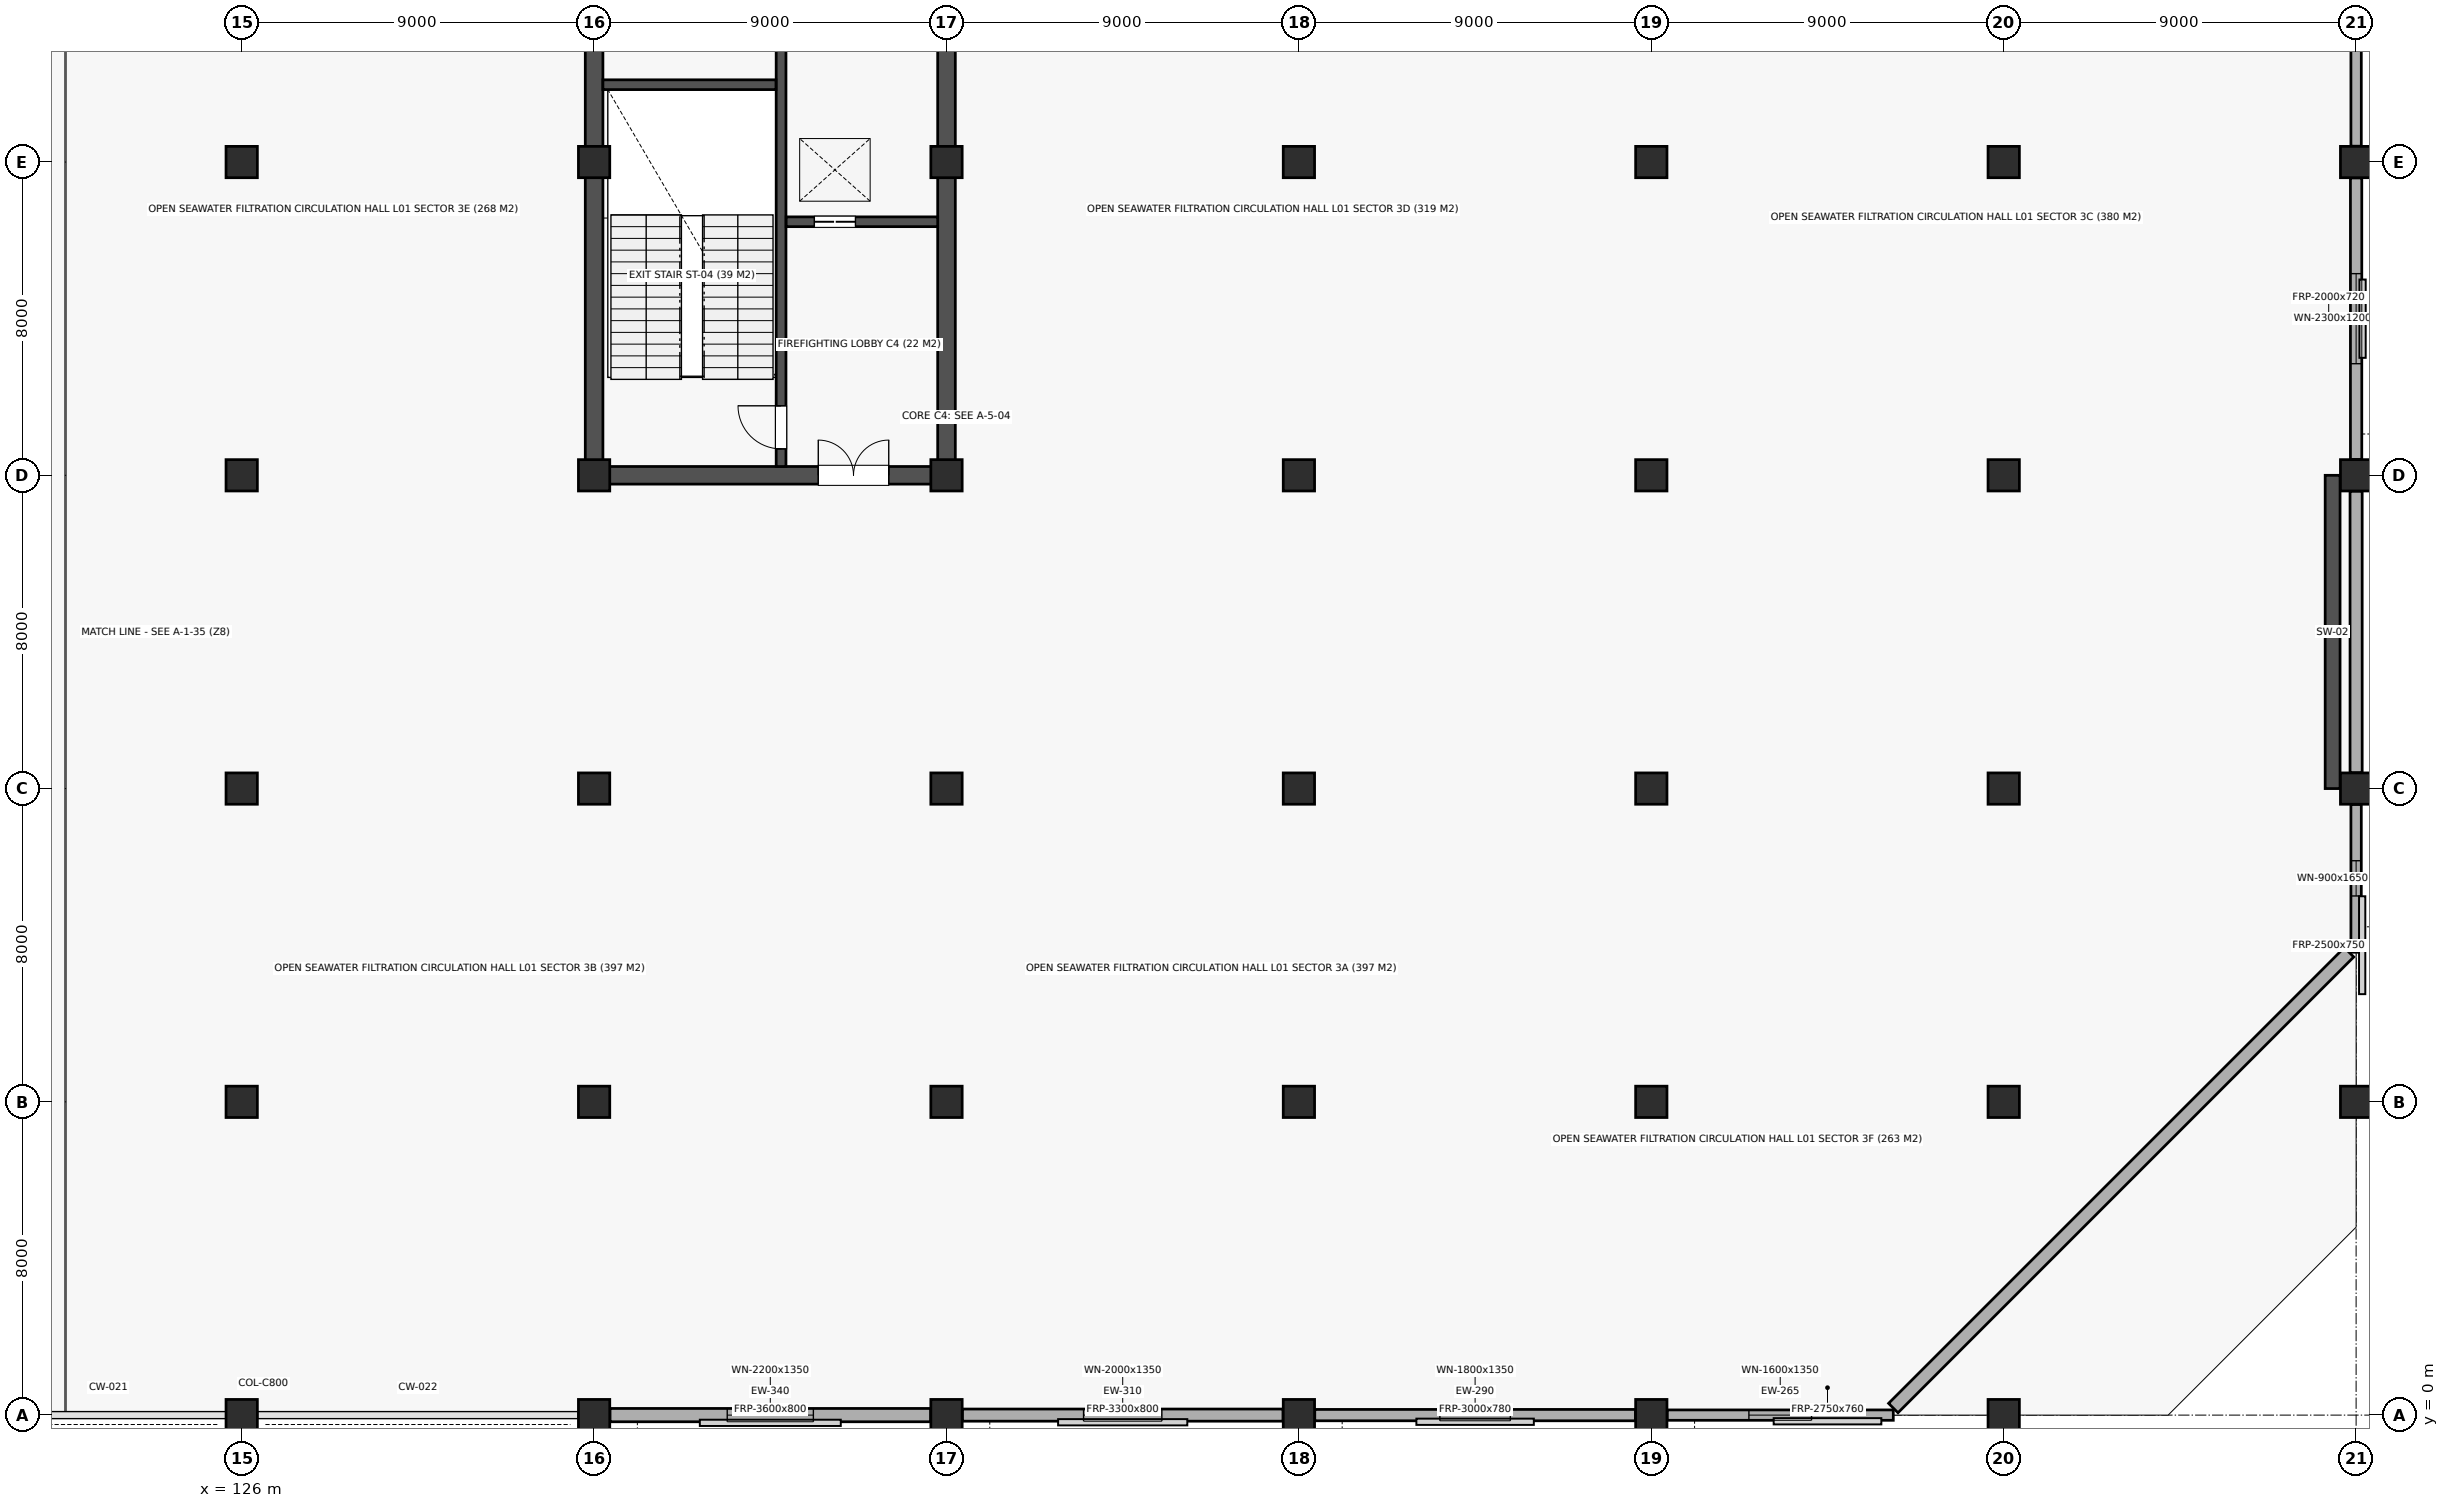
"""IFC4 building model, lengths in metres.
Left out: names, types, materials, properties, quantities, classifications, styles, units other than length and angle.
Written with IfcOpenShell. Run it as: python <this file> out.ifc"""

import sys

from ifc_helpers import new_model, si_unit, direction, frame, frame_2d, origin, origin_2d, place, context, subcontext, project, spatial, rectangle, extrude, element, fill, save


model = new_model("IFC4")
c1 = context("Model", 3, precision=1e-05, world=origin(), true_north=direction((0.0, 1.0)))
c2 = subcontext(c1, "Body", "Model", "MODEL_VIEW")
j1 = project(units=[si_unit("LENGTHUNIT", "METRE"), si_unit("PLANEANGLEUNIT", "RADIAN")], contexts=[c1])
p1 = place(None, origin())
s1 = spatial("IfcSite", under=j1, at=p1, CompositionType="ELEMENT")
p2 = place(p1, origin())
s2 = spatial("IfcBuilding", under=s1, at=p2, CompositionType="ELEMENT")
p3 = place(p2, frame((0.0, 0.0, 4.5)))
s3 = spatial("IfcBuildingStorey", under=s2, at=p3, CompositionType="ELEMENT", Elevation=4.5)
for number, where, z_axis, x_axis in (
    (1, (126.0, 0.0, 0.0), (0.0, 0.0, 1.0), (1.0, 0.0, 0.0)),
    (2, (126.0, 8.0, 0.0), (0.0, 0.0, 1.0), (1.0, 0.0, 0.0)),
    (3, (126.0, 16.0, 0.0), (0.0, 0.0, 1.0), (1.0, 0.0, 0.0)),
    (4, (126.0, 24.0, 0.0), (0.0, 0.0, 1.0), (1.0, 0.0, 0.0)),
    (5, (126.0, 32.0, 0.0), (0.0, 0.0, 1.0), (1.0, 0.0, 0.0)),
    (6, (135.0, 0.0, 0.0), (0.0, 0.0, 1.0), (1.0, 0.0, 0.0)),
    (7, (135.0, 8.0, 0.0), (0.0, 0.0, 1.0), (1.0, 0.0, 0.0)),
    (8, (135.0, 16.0, 0.0), (0.0, 0.0, 1.0), (1.0, 0.0, 0.0)),
    (9, (135.0, 24.0, 0.0), (0.0, 0.0, 1.0), (1.0, 0.0, 0.0)),
    (10, (135.0, 32.0, 0.0), (0.0, 0.0, 1.0), (1.0, 0.0, 0.0)),
    (11, (144.0, 0.0, 0.0), (0.0, 0.0, 1.0), (1.0, 0.0, 0.0)),
    (12, (144.0, 8.0, 0.0), (0.0, 0.0, 1.0), (1.0, 0.0, 0.0)),
    (13, (144.0, 16.0, 0.0), (0.0, 0.0, 1.0), (1.0, 0.0, 0.0)),
    (14, (144.0, 24.0, 0.0), (0.0, 0.0, 1.0), (1.0, 0.0, 0.0)),
    (15, (144.0, 32.0, 0.0), (0.0, 0.0, 1.0), (1.0, 0.0, 0.0)),
    (16, (153.0, 0.0, 0.0), (0.0, 0.0, 1.0), (1.0, 0.0, 0.0)),
    (17, (153.0, 8.0, 0.0), (0.0, 0.0, 1.0), (1.0, 0.0, 0.0)),
    (18, (153.0, 16.0, 0.0), (0.0, 0.0, 1.0), (1.0, 0.0, 0.0)),
    (19, (153.0, 24.0, 0.0), (0.0, 0.0, 1.0), (1.0, 0.0, 0.0)),
    (20, (153.0, 32.0, 0.0), (0.0, 0.0, 1.0), (1.0, 0.0, 0.0)),
    (21, (162.0, 0.0, 0.0), (0.0, 0.0, 1.0), (1.0, 0.0, 0.0)),
    (22, (162.0, 8.0, 0.0), (0.0, 0.0, 1.0), (1.0, 0.0, 0.0)),
    (23, (162.0, 16.0, 0.0), (0.0, 0.0, 1.0), (1.0, 0.0, 0.0)),
    (24, (162.0, 24.0, 0.0), (0.0, 0.0, 1.0), (1.0, 0.0, 0.0)),
    (25, (162.0, 32.0, 0.0), (0.0, 0.0, 1.0), (1.0, 0.0, 0.0)),
    (26, (171.0, 0.0, 0.0), (0.0, 0.0, 1.0), (1.0, 0.0, 0.0)),
    (27, (171.0, 8.0, 0.0), (0.0, 0.0, 1.0), (1.0, 0.0, 0.0)),
    (28, (171.0, 16.0, 0.0), (0.0, 0.0, 1.0), (1.0, 0.0, 0.0)),
    (29, (171.0, 24.0, 0.0), (0.0, 0.0, 1.0), (1.0, 0.0, 0.0)),
    (30, (171.0, 32.0, 0.0), (0.0, 0.0, 1.0), (1.0, 0.0, 0.0)),
    (31, (180.0, 8.0, 0.0), (0.0, 0.0, 1.0), (1.0, 0.0, 0.0)),
    (32, (180.0, 16.0, 0.0), (0.0, 0.0, 1.0), (1.0, 0.0, 0.0)),
    (33, (180.0, 24.0, 0.0), (0.0, 0.0, 1.0), (1.0, 0.0, 0.0)),
    (34, (180.0, 32.0, 0.0), (0.0, 0.0, 1.0), (1.0, 0.0, 0.0)),
):
    element("IfcColumn", number, at=place(p3, frame(where, z_axis=z_axis, x_axis=x_axis)), inside=s3, PredefinedType="COLUMN", context=c2, shape_type="SweptSolid", body=[
        extrude(rectangle(XDim=0.8, YDim=0.8, at=origin_2d()), origin(), (0.0, 0.0, 1.0), 4.5),
    ])
p4 = place(p3, frame((179.4, 16.0, 0.0), z_axis=(0.0, 0.0, 1.0), x_axis=(0.0, 1.0, 0.0)))
e35 = element("IfcWall", 35, at=p4, inside=s3, PredefinedType="SHEAR", context=c2, shape_type="SweptSolid", body=[
    extrude(rectangle(XDim=8.0, YDim=0.38, at=frame_2d((4.0, 0.0))), origin(), (0.0, 0.0, 1.0), 4.18),
])
p5 = place(p3, frame((135.225, 24.0, 0.0), z_axis=(0.0, 0.0, 1.0), x_axis=(1.0, 0.0, 0.0)))
e36 = element("IfcWall", 36, at=p5, inside=s3, PredefinedType="SHEAR", context=c2, shape_type="SweptSolid", body=[
    extrude(rectangle(XDim=8.55, YDim=0.45, at=frame_2d((4.275, 0.0))), origin(), (0.0, 0.0, 1.0), 4.18),
])
p6 = place(p5, frame((5.5, 0.0, 0.0)))
e37 = element("IfcOpeningElement", 37, at=p6, cuts=e36, PredefinedType="OPENING", context=c2, shape_type="SweptSolid", body=[
    extrude(rectangle(XDim=1.8, YDim=2.18, at=frame_2d((0.9, 1.09))), frame((0.0, 0.237, 0.0), z_axis=(0.0, -1.0, 0.0), x_axis=(1.0, 0.0, 0.0)), (0.0, 0.0, 1.0), 0.474),
])
p7 = place(p3, frame((135.0, 24.225, 0.0), z_axis=(0.0, 0.0, 1.0), x_axis=(0.0, 1.0, 0.0)))
e38 = element("IfcWall", 38, at=p7, inside=s3, PredefinedType="SHEAR", context=c2, shape_type="SweptSolid", body=[
    extrude(rectangle(XDim=15.55, YDim=0.45, at=frame_2d((7.775, 0.0))), origin(), (0.0, 0.0, 1.0), 4.18),
])
p8 = place(p7, frame((11.2, 0.0, 0.0)))
e39 = element("IfcOpeningElement", 39, at=p8, cuts=e38, PredefinedType="OPENING", context=c2, shape_type="SweptSolid", body=[
    extrude(rectangle(XDim=0.95, YDim=2.1, at=frame_2d((0.475, 1.05))), frame((0.0, 0.237, 0.0), z_axis=(0.0, -1.0, 0.0), x_axis=(1.0, 0.0, 0.0)), (0.0, 0.0, 1.0), 0.474),
])
p9 = place(p3, frame((144.0, 24.225, 0.0), z_axis=(0.0, 0.0, 1.0), x_axis=(0.0, 1.0, 0.0)))
e40 = element("IfcWall", 40, at=p9, inside=s3, PredefinedType="SHEAR", context=c2, shape_type="SweptSolid", body=[
    extrude(rectangle(XDim=15.55, YDim=0.45, at=frame_2d((7.775, 0.0))), origin(), (0.0, 0.0, 1.0), 4.18),
])
p10 = place(p3, frame((139.775, 24.225, 0.0), z_axis=(0.0, 0.0, 1.0), x_axis=(0.0, 1.0, 0.0)))
e41 = element("IfcWall", 41, at=p10, inside=s3, PredefinedType="SOLIDWALL", context=c2, shape_type="SweptSolid", body=[
    extrude(rectangle(XDim=15.55, YDim=0.25, at=frame_2d((7.775, 0.0))), origin(), (0.0, 0.0, 1.0), 4.18),
])
p11 = place(p10, frame((0.45, 0.0, 0.0)))
e42 = element("IfcOpeningElement", 42, at=p11, cuts=e41, PredefinedType="OPENING", context=c2, shape_type="SweptSolid", body=[
    extrude(rectangle(XDim=1.1, YDim=2.15, at=frame_2d((0.55, 1.075))), frame((0.0, 0.137, 0.0), z_axis=(0.0, -1.0, 0.0), x_axis=(1.0, 0.0, 0.0)), (0.0, 0.0, 1.0), 0.274),
])
p12 = place(p3, frame((135.225, 33.975, 0.0), z_axis=(0.0, 0.0, 1.0), x_axis=(1.0, 0.0, 0.0)))
e43 = element("IfcWall", 43, at=p12, inside=s3, PredefinedType="SOLIDWALL", context=c2, shape_type="SweptSolid", body=[
    extrude(rectangle(XDim=4.42, YDim=0.25, at=frame_2d((2.21, 0.0))), origin(), (0.0, 0.0, 1.0), 4.18),
])
p13 = place(p3, frame((139.905, 30.475, 0.0), z_axis=(0.0, 0.0, 1.0), x_axis=(1.0, 0.0, 0.0)))
e44 = element("IfcWall", 44, at=p13, inside=s3, PredefinedType="SOLIDWALL", context=c2, shape_type="SweptSolid", body=[
    extrude(rectangle(XDim=3.87, YDim=0.25, at=frame_2d((1.935, 0.0))), origin(), (0.0, 0.0, 1.0), 4.18),
])
p14 = place(p13, frame((0.72, 0.0, 0.0)))
e45 = element("IfcOpeningElement", 45, at=p14, cuts=e44, PredefinedType="OPENING", context=c2, shape_type="SweptSolid", body=[
    extrude(rectangle(XDim=1.05, YDim=2.12, at=frame_2d((0.525, 1.06))), frame((0.0, 0.137, 0.0), z_axis=(0.0, -1.0, 0.0), x_axis=(1.0, 0.0, 0.0)), (0.0, 0.0, 1.0), 0.274),
])
p15 = place(p3, frame((135.405, 0.0, 0.0), z_axis=(0.0, 0.0, 1.0), x_axis=(1.0, 0.0, 0.0)))
e46 = element("IfcWall", 46, at=p15, inside=s3, PredefinedType="STANDARD", context=c2, shape_type="SweptSolid", body=[
    extrude(rectangle(XDim=8.19, YDim=0.34, at=frame_2d((4.095, 0.0))), origin(), (0.0, 0.0, 1.0), 3.46),
])
p16 = place(p15, frame((2.995, 0.0, 0.85)))
e47 = element("IfcOpeningElement", 47, at=p16, cuts=e46, PredefinedType="OPENING", context=c2, shape_type="SweptSolid", body=[
    extrude(rectangle(XDim=2.2, YDim=1.35, at=frame_2d((1.1, 0.675))), frame((0.0, 0.182, 0.0), z_axis=(0.0, -1.0, 0.0), x_axis=(1.0, 0.0, 0.0)), (0.0, 0.0, 1.0), 0.364),
])
p17 = place(p3, frame((144.405, 0.0, 0.0), z_axis=(0.0, 0.0, 1.0), x_axis=(1.0, 0.0, 0.0)))
e48 = element("IfcWall", 48, at=p17, inside=s3, PredefinedType="STANDARD", context=c2, shape_type="SweptSolid", body=[
    extrude(rectangle(XDim=8.19, YDim=0.31, at=frame_2d((4.095, 0.0))), origin(), (0.0, 0.0, 1.0), 3.46),
])
p18 = place(p17, frame((3.095, 0.0, 0.85)))
e49 = element("IfcOpeningElement", 49, at=p18, cuts=e48, PredefinedType="OPENING", context=c2, shape_type="SweptSolid", body=[
    extrude(rectangle(XDim=2.0, YDim=1.35, at=frame_2d((1.0, 0.675))), frame((0.0, 0.167, 0.0), z_axis=(0.0, -1.0, 0.0), x_axis=(1.0, 0.0, 0.0)), (0.0, 0.0, 1.0), 0.334),
])
p19 = place(p3, frame((153.405, 0.0, 0.0), z_axis=(0.0, 0.0, 1.0), x_axis=(1.0, 0.0, 0.0)))
e50 = element("IfcWall", 50, at=p19, inside=s3, PredefinedType="STANDARD", context=c2, shape_type="SweptSolid", body=[
    extrude(rectangle(XDim=8.19, YDim=0.29, at=frame_2d((4.095, 0.0))), origin(), (0.0, 0.0, 1.0), 3.46),
])
p20 = place(p19, frame((3.195, 0.0, 0.85)))
e51 = element("IfcOpeningElement", 51, at=p20, cuts=e50, PredefinedType="OPENING", context=c2, shape_type="SweptSolid", body=[
    extrude(rectangle(XDim=1.8, YDim=1.35, at=frame_2d((0.9, 0.675))), frame((0.0, 0.157, 0.0), z_axis=(0.0, -1.0, 0.0), x_axis=(1.0, 0.0, 0.0)), (0.0, 0.0, 1.0), 0.314),
])
p21 = place(p3, frame((162.405, 0.0, 0.0), z_axis=(0.0, 0.0, 1.0), x_axis=(1.0, 0.0, 0.0)))
e52 = element("IfcWall", 52, at=p21, inside=s3, PredefinedType="STANDARD", context=c2, shape_type="SweptSolid", body=[
    extrude(rectangle(XDim=5.775, YDim=0.265, at=frame_2d((2.887, 0.0))), origin(), (0.0, 0.0, 1.0), 3.46),
])
p22 = place(p21, frame((2.087, 0.0, 0.85)))
e53 = element("IfcOpeningElement", 53, at=p22, cuts=e52, PredefinedType="OPENING", context=c2, shape_type="SweptSolid", body=[
    extrude(rectangle(XDim=1.6, YDim=1.35, at=frame_2d((0.8, 0.675))), frame((0.0, 0.145, 0.0), z_axis=(0.0, -1.0, 0.0), x_axis=(1.0, 0.0, 0.0)), (0.0, 0.0, 1.0), 0.289),
])
p23 = place(p3, frame((168.18, 0.18, 0.0), z_axis=(0.0, 0.0, 1.0), x_axis=(0.707106781187, 0.707106781187, 0.0)))
e54 = element("IfcWall", 54, at=p23, inside=s3, PredefinedType="STANDARD", context=c2, shape_type="SweptSolid", body=[
    extrude(rectangle(XDim=16.462, YDim=0.34, at=frame_2d((8.231, 0.0))), origin(), (0.0, 0.0, 1.0), 3.46),
])
p24 = place(p3, frame((180.0, 11.82, 0.0), z_axis=(0.0, 0.0, 1.0), x_axis=(0.0, 1.0, 0.0)))
e55 = element("IfcWall", 55, at=p24, inside=s3, PredefinedType="STANDARD", context=c2, shape_type="SweptSolid", body=[
    extrude(rectangle(XDim=3.775, YDim=0.265, at=frame_2d((1.887, 0.0))), origin(), (0.0, 0.0, 1.0), 3.46),
])
p25 = place(p24, frame((1.438, 0.0, 0.85)))
e56 = element("IfcOpeningElement", 56, at=p25, cuts=e55, PredefinedType="OPENING", context=c2, shape_type="SweptSolid", body=[
    extrude(rectangle(XDim=0.9, YDim=1.65, at=frame_2d((0.45, 0.825))), frame((0.0, 0.145, 0.0), z_axis=(0.0, -1.0, 0.0), x_axis=(1.0, 0.0, 0.0)), (0.0, 0.0, 1.0), 0.289),
])
p26 = place(p3, frame((180.0, 16.405, 0.0), z_axis=(0.0, 0.0, 1.0), x_axis=(0.0, 1.0, 0.0)))
e57 = element("IfcWall", 57, at=p26, inside=s3, PredefinedType="STANDARD", context=c2, shape_type="SweptSolid", body=[
    extrude(rectangle(XDim=7.19, YDim=0.31, at=frame_2d((3.595, 0.0))), origin(), (0.0, 0.0, 1.0), 3.46),
])
p27 = place(p3, frame((180.0, 24.405, 0.0), z_axis=(0.0, 0.0, 1.0), x_axis=(0.0, 1.0, 0.0)))
e58 = element("IfcWall", 58, at=p27, inside=s3, PredefinedType="STANDARD", context=c2, shape_type="SweptSolid", body=[
    extrude(rectangle(XDim=7.19, YDim=0.29, at=frame_2d((3.595, 0.0))), origin(), (0.0, 0.0, 1.0), 3.46),
])
p28 = place(p27, frame((2.445, 0.0, 0.85)))
e59 = element("IfcOpeningElement", 59, at=p28, cuts=e58, PredefinedType="OPENING", context=c2, shape_type="SweptSolid", body=[
    extrude(rectangle(XDim=2.3, YDim=1.2, at=frame_2d((1.15, 0.6))), frame((0.0, 0.157, 0.0), z_axis=(0.0, -1.0, 0.0), x_axis=(1.0, 0.0, 0.0)), (0.0, 0.0, 1.0), 0.314),
])
p29 = place(p3, frame((180.0, 32.405, 0.0), z_axis=(0.0, 0.0, 1.0), x_axis=(0.0, 1.0, 0.0)))
e60 = element("IfcWall", 60, at=p29, inside=s3, PredefinedType="STANDARD", context=c2, shape_type="SweptSolid", body=[
    extrude(rectangle(XDim=7.19, YDim=0.265, at=frame_2d((3.595, 0.0))), origin(), (0.0, 0.0, 1.0), 3.46),
])
p30 = place(p29, frame((2.445, 0.0, 0.85)))
e61 = element("IfcOpeningElement", 61, at=p30, cuts=e60, PredefinedType="OPENING", context=c2, shape_type="SweptSolid", body=[
    extrude(rectangle(XDim=2.3, YDim=1.2, at=frame_2d((1.15, 0.6))), frame((0.0, 0.145, 0.0), z_axis=(0.0, -1.0, 0.0), x_axis=(1.0, 0.0, 0.0)), (0.0, 0.0, 1.0), 0.289),
])
p31 = place(p6, origin())
e62 = element("IfcDoor", 62, at=p31, inside=s3, OperationType="DOUBLE_DOOR_SINGLE_SWING", PredefinedType="DOOR", context=c2, shape_type="SweptSolid", body=[
    extrude(rectangle(XDim=1.8, YDim=2.18, at=frame_2d((0.9, 1.09))), frame((0.0, 0.025, 0.0), z_axis=(0.0, -1.0, 0.0), x_axis=(1.0, 0.0, 0.0)), (0.0, 0.0, 1.0), 0.05),
])
fill(e37, e62)
p32 = place(p11, origin())
e63 = element("IfcDoor", 63, at=p32, inside=s3, OperationType="SINGLE_SWING_RIGHT", PredefinedType="DOOR", context=c2, shape_type="SweptSolid", body=[
    extrude(rectangle(XDim=1.1, YDim=2.15, at=frame_2d((0.55, 1.075))), frame((0.0, 0.025, 0.0), z_axis=(0.0, -1.0, 0.0), x_axis=(1.0, 0.0, 0.0)), (0.0, 0.0, 1.0), 0.05),
])
fill(e42, e63)
p33 = place(p14, origin())
e64 = element("IfcDoor", 64, at=p33, inside=s3, OperationType="DOUBLE_DOOR_SLIDING", PredefinedType="DOOR", context=c2, shape_type="SweptSolid", body=[
    extrude(rectangle(XDim=1.05, YDim=2.12, at=frame_2d((0.525, 1.06))), frame((0.0, 0.025, 0.0), z_axis=(0.0, -1.0, 0.0), x_axis=(1.0, 0.0, 0.0)), (0.0, 0.0, 1.0), 0.05),
])
fill(e45, e64)
p34 = place(p16, origin())
e65 = element("IfcWindow", 65, at=p34, inside=s3, PartitioningType="SINGLE_PANEL", PredefinedType="WINDOW", context=c2, shape_type="SweptSolid", body=[
    extrude(rectangle(XDim=2.2, YDim=1.35, at=frame_2d((1.1, 0.675))), frame((0.0, 0.03, 0.0), z_axis=(0.0, -1.0, 0.0), x_axis=(1.0, 0.0, 0.0)), (0.0, 0.0, 1.0), 0.06),
])
fill(e47, e65)
p35 = place(p18, origin())
e66 = element("IfcWindow", 66, at=p35, inside=s3, PartitioningType="SINGLE_PANEL", PredefinedType="WINDOW", context=c2, shape_type="SweptSolid", body=[
    extrude(rectangle(XDim=2.0, YDim=1.35, at=frame_2d((1.0, 0.675))), frame((0.0, 0.03, 0.0), z_axis=(0.0, -1.0, 0.0), x_axis=(1.0, 0.0, 0.0)), (0.0, 0.0, 1.0), 0.06),
])
fill(e49, e66)
p36 = place(p20, origin())
e67 = element("IfcWindow", 67, at=p36, inside=s3, PartitioningType="SINGLE_PANEL", PredefinedType="WINDOW", context=c2, shape_type="SweptSolid", body=[
    extrude(rectangle(XDim=1.8, YDim=1.35, at=frame_2d((0.9, 0.675))), frame((0.0, 0.03, 0.0), z_axis=(0.0, -1.0, 0.0), x_axis=(1.0, 0.0, 0.0)), (0.0, 0.0, 1.0), 0.06),
])
fill(e51, e67)
p37 = place(p22, origin())
e68 = element("IfcWindow", 68, at=p37, inside=s3, PartitioningType="SINGLE_PANEL", PredefinedType="WINDOW", context=c2, shape_type="SweptSolid", body=[
    extrude(rectangle(XDim=1.6, YDim=1.35, at=frame_2d((0.8, 0.675))), frame((0.0, 0.03, 0.0), z_axis=(0.0, -1.0, 0.0), x_axis=(1.0, 0.0, 0.0)), (0.0, 0.0, 1.0), 0.06),
])
fill(e53, e68)
p38 = place(p25, origin())
e69 = element("IfcWindow", 69, at=p38, inside=s3, PartitioningType="SINGLE_PANEL", PredefinedType="WINDOW", context=c2, shape_type="SweptSolid", body=[
    extrude(rectangle(XDim=0.9, YDim=1.65, at=frame_2d((0.45, 0.825))), frame((0.0, 0.03, 0.0), z_axis=(0.0, -1.0, 0.0), x_axis=(1.0, 0.0, 0.0)), (0.0, 0.0, 1.0), 0.06),
])
fill(e56, e69)
p39 = place(p28, origin())
e70 = element("IfcWindow", 70, at=p39, inside=s3, PartitioningType="SINGLE_PANEL", PredefinedType="WINDOW", context=c2, shape_type="SweptSolid", body=[
    extrude(rectangle(XDim=2.3, YDim=1.2, at=frame_2d((1.15, 0.6))), frame((0.0, 0.03, 0.0), z_axis=(0.0, -1.0, 0.0), x_axis=(1.0, 0.0, 0.0)), (0.0, 0.0, 1.0), 0.06),
])
fill(e59, e70)
save(model, sys.argv[1])
